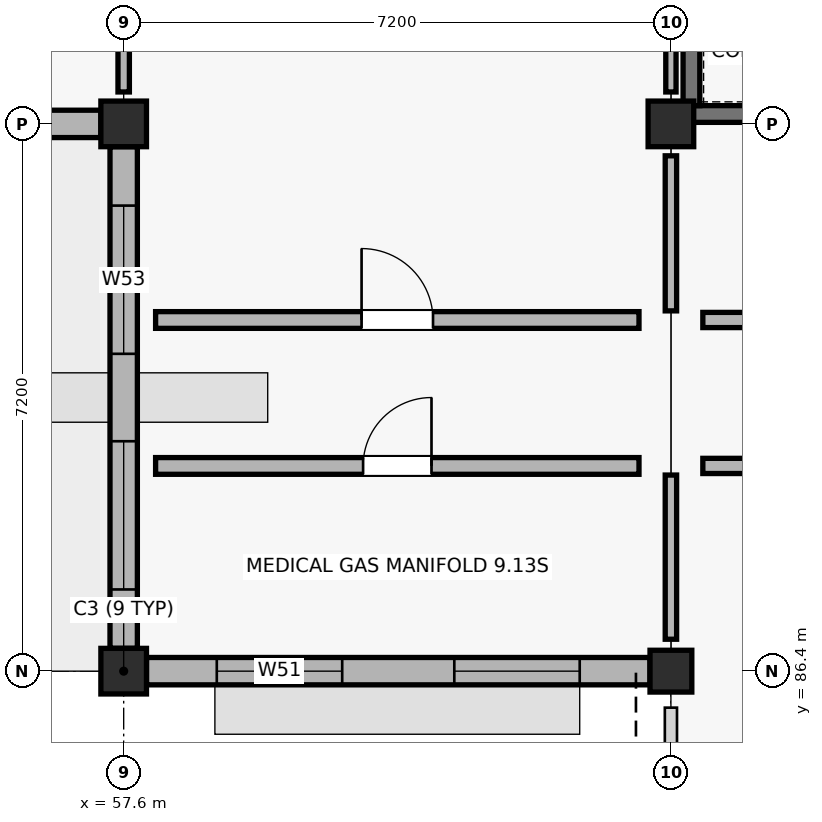
"""IFC4 building model, lengths in metres.
Left out: names, types, materials, properties, quantities, classifications, styles, units other than length and angle.
Written with IfcOpenShell. Run it as: python <this file> out.ifc"""

import sys

from ifc_helpers import new_model, si_unit, direction, frame, frame_2d, origin, origin_2d, place, context, subcontext, project, spatial, rectangle, extrude, element, fill, save


model = new_model("IFC4")
c1 = context("Model", 3, precision=1e-05, world=origin(), true_north=direction((0.0, 1.0)))
c2 = subcontext(c1, "Body", "Model", "MODEL_VIEW")
j1 = project(units=[si_unit("LENGTHUNIT", "METRE"), si_unit("PLANEANGLEUNIT", "RADIAN")], contexts=[c1])
p1 = place(None, origin())
s1 = spatial("IfcSite", under=j1, at=p1, CompositionType="ELEMENT")
p2 = place(p1, origin())
s2 = spatial("IfcBuilding", under=s1, at=p2, CompositionType="ELEMENT")
p3 = place(p2, origin())
s3 = spatial("IfcBuildingStorey", under=s2, at=p3, CompositionType="ELEMENT", Elevation=0.0)
for number, where, z_axis, x_axis in (
    (1, (57.6, 86.4, -0.25), (0.0, 0.0, 1.0), (1.0, 0.0, 0.0)),
    (2, (57.6, 93.6, -0.25), (0.0, 0.0, 1.0), (1.0, 0.0, 0.0)),
):
    element("IfcColumn", number, at=place(p3, frame(where, z_axis=z_axis, x_axis=x_axis)), inside=s3, PredefinedType="COLUMN", context=c2, shape_type="SweptSolid", body=[
        extrude(rectangle(XDim=0.6, YDim=0.6, at=origin_2d()), origin(), (0.0, 0.0, 1.0), 4.75),
    ])
p4 = place(p3, frame((64.8, 86.4, -0.25), z_axis=(0.0, 0.0, 1.0), x_axis=(1.0, 0.0, 0.0)))
e3 = element("IfcColumn", 3, at=p4, inside=s3, PredefinedType="COLUMN", context=c2, shape_type="SweptSolid", body=[
    extrude(rectangle(XDim=0.55, YDim=0.55, at=origin_2d()), origin(), (0.0, 0.0, 1.0), 4.75),
])
p5 = place(p3, frame((64.8, 93.6, -0.25), z_axis=(0.0, 0.0, 1.0), x_axis=(1.0, 0.0, 0.0)))
e4 = element("IfcColumn", 4, at=p5, inside=s3, PredefinedType="COLUMN", context=c2, shape_type="SweptSolid", body=[
    extrude(rectangle(XDim=0.6, YDim=0.6, at=origin_2d()), origin(), (0.0, 0.0, 1.0), 4.75),
])
p6 = place(p3, frame((50.7, 93.6, 0.0), z_axis=(0.0, 0.0, 1.0), x_axis=(1.0, 0.0, 0.0)))
e5 = element("IfcWall", 5, at=p6, inside=s3, PredefinedType="SOLIDWALL", context=c2, shape_type="SweptSolid", body=[
    extrude(rectangle(XDim=6.6, YDim=0.36, at=frame_2d((3.3, 0.0))), origin(), (0.0, 0.0, 1.0), 3.47),
])
p7 = place(p6, frame((0.675, 0.0, 0.9)))
e6 = element("IfcOpeningElement", 6, at=p7, cuts=e5, PredefinedType="OPENING", context=c2, shape_type="SweptSolid", body=[
    extrude(rectangle(XDim=2.15, YDim=1.75, at=frame_2d((1.075, 0.875))), frame((0.0, 0.19, 0.0), z_axis=(0.0, -1.0, 0.0), x_axis=(1.0, 0.0, 0.0)), (0.0, 0.0, 1.0), 0.38),
])
p8 = place(p6, frame((3.775, 0.0, 0.9)))
e7 = element("IfcOpeningElement", 7, at=p8, cuts=e5, PredefinedType="OPENING", context=c2, shape_type="SweptSolid", body=[
    extrude(rectangle(XDim=2.15, YDim=1.75, at=frame_2d((1.075, 0.875))), frame((0.0, 0.19, 0.0), z_axis=(0.0, -1.0, 0.0), x_axis=(1.0, 0.0, 0.0)), (0.0, 0.0, 1.0), 0.38),
])
p9 = place(p3, frame((57.9, 86.4, 0.0), z_axis=(0.0, 0.0, 1.0), x_axis=(1.0, 0.0, 0.0)))
e8 = element("IfcWall", 8, at=p9, inside=s3, PredefinedType="SOLIDWALL", context=c2, shape_type="SweptSolid", body=[
    extrude(rectangle(XDim=6.625, YDim=0.36, at=frame_2d((3.312, 0.0))), origin(), (0.0, 0.0, 1.0), 3.47),
])
p10 = place(p9, frame((0.925, 0.0, 0.9)))
e9 = element("IfcOpeningElement", 9, at=p10, cuts=e8, PredefinedType="OPENING", context=c2, shape_type="SweptSolid", body=[
    extrude(rectangle(XDim=1.65, YDim=1.88, at=frame_2d((0.825, 0.94))), frame((0.0, 0.19, 0.0), z_axis=(0.0, -1.0, 0.0), x_axis=(1.0, 0.0, 0.0)), (0.0, 0.0, 1.0), 0.38),
])
p11 = place(p9, frame((4.05, 0.0, 0.9)))
e10 = element("IfcOpeningElement", 10, at=p11, cuts=e8, PredefinedType="OPENING", context=c2, shape_type="SweptSolid", body=[
    extrude(rectangle(XDim=1.65, YDim=1.88, at=frame_2d((0.825, 0.94))), frame((0.0, 0.19, 0.0), z_axis=(0.0, -1.0, 0.0), x_axis=(1.0, 0.0, 0.0)), (0.0, 0.0, 1.0), 0.38),
])
p12 = place(p3, frame((57.6, 93.3, 0.0), z_axis=(0.0, 0.0, 1.0), x_axis=(0.0, -1.0, 0.0)))
e11 = element("IfcWall", 11, at=p12, inside=s3, PredefinedType="SOLIDWALL", context=c2, shape_type="SweptSolid", body=[
    extrude(rectangle(XDim=6.6, YDim=0.36, at=frame_2d((3.3, 0.0))), origin(), (0.0, 0.0, 1.0), 3.52),
])
p13 = place(p12, frame((0.775, 0.0, 0.9)))
e12 = element("IfcOpeningElement", 12, at=p13, cuts=e11, PredefinedType="OPENING", context=c2, shape_type="SweptSolid", body=[
    extrude(rectangle(XDim=1.95, YDim=1.88, at=frame_2d((0.975, 0.94))), frame((0.0, 0.19, 0.0), z_axis=(0.0, -1.0, 0.0), x_axis=(1.0, 0.0, 0.0)), (0.0, 0.0, 1.0), 0.38),
])
p14 = place(p12, frame((3.875, 0.0, 0.9)))
e13 = element("IfcOpeningElement", 13, at=p14, cuts=e11, PredefinedType="OPENING", context=c2, shape_type="SweptSolid", body=[
    extrude(rectangle(XDim=1.95, YDim=1.88, at=frame_2d((0.975, 0.94))), frame((0.0, 0.19, 0.0), z_axis=(0.0, -1.0, 0.0), x_axis=(1.0, 0.0, 0.0)), (0.0, 0.0, 1.0), 0.38),
])
p15 = place(p3, frame((64.96, 93.73, -0.25), z_axis=(0.0, 0.0, 1.0), x_axis=(1.0, 0.0, 0.0)))
e14 = element("IfcWall", 14, at=p15, inside=s3, PredefinedType="SHEAR", context=c2, shape_type="SweptSolid", body=[
    extrude(rectangle(XDim=6.88, YDim=0.22, at=frame_2d((3.44, 0.0))), origin(), (0.0, 0.0, 1.0), 4.47),
])
p16 = place(p3, frame((65.07, 93.84, -0.25), z_axis=(0.0, 0.0, 1.0), x_axis=(0.0, 1.0, 0.0)))
e15 = element("IfcWall", 15, at=p16, inside=s3, PredefinedType="SHEAR", context=c2, shape_type="SweptSolid", body=[
    extrude(rectangle(XDim=3.0, YDim=0.22, at=frame_2d((1.5, 0.0))), origin(), (0.0, 0.0, 1.0), 4.47),
])
p17 = place(p3, frame((65.22, 89.1, 0.0), z_axis=(0.0, 0.0, 1.0), x_axis=(1.0, 0.0, 0.0)))
e16 = element("IfcWall", 16, at=p17, inside=s3, PredefinedType="SOLIDWALL", context=c2, shape_type="SweptSolid", body=[
    extrude(rectangle(XDim=6.36, YDim=0.2, at=frame_2d((3.18, 0.0))), origin(), (0.0, 0.0, 1.0), 3.36),
])
p18 = place(p17, frame((2.505, 0.0, 0.0)))
e17 = element("IfcOpeningElement", 17, at=p18, cuts=e16, PredefinedType="OPENING", context=c2, shape_type="SweptSolid", body=[
    extrude(rectangle(XDim=1.35, YDim=2.2, at=frame_2d((0.675, 1.1))), frame((0.0, 0.11, 0.0), z_axis=(0.0, -1.0, 0.0), x_axis=(1.0, 0.0, 0.0)), (0.0, 0.0, 1.0), 0.22),
])
p19 = place(p3, frame((65.22, 91.02, 0.0), z_axis=(0.0, 0.0, 1.0), x_axis=(1.0, 0.0, 0.0)))
e18 = element("IfcWall", 18, at=p19, inside=s3, PredefinedType="SOLIDWALL", context=c2, shape_type="SweptSolid", body=[
    extrude(rectangle(XDim=6.36, YDim=0.2, at=frame_2d((3.18, 0.0))), origin(), (0.0, 0.0, 1.0), 3.36),
])
p20 = place(p19, frame((2.53, 0.0, 0.0)))
e19 = element("IfcOpeningElement", 19, at=p20, cuts=e18, PredefinedType="OPENING", context=c2, shape_type="SweptSolid", body=[
    extrude(rectangle(XDim=1.3, YDim=2.15, at=frame_2d((0.65, 1.075))), frame((0.0, 0.11, 0.0), z_axis=(0.0, -1.0, 0.0), x_axis=(1.0, 0.0, 0.0)), (0.0, 0.0, 1.0), 0.22),
])
p21 = place(p3, frame((57.6, 94.02, 0.0), z_axis=(0.0, 0.0, 1.0), x_axis=(0.0, 1.0, 0.0)))
e20 = element("IfcWall", 20, at=p21, inside=s3, PredefinedType="PARTITIONING", context=c2, shape_type="SweptSolid", body=[
    extrude(rectangle(XDim=2.16, YDim=0.15, at=frame_2d((1.08, 0.0))), origin(), (0.0, 0.0, 1.0), 3.36),
])
p22 = place(p3, frame((58.02, 89.1, 0.0), z_axis=(0.0, 0.0, 1.0), x_axis=(1.0, 0.0, 0.0)))
e21 = element("IfcWall", 21, at=p22, inside=s3, PredefinedType="SOLIDWALL", context=c2, shape_type="SweptSolid", body=[
    extrude(rectangle(XDim=6.36, YDim=0.22, at=frame_2d((3.18, 0.0))), origin(), (0.0, 0.0, 1.0), 3.36),
])
p23 = place(p22, frame((2.73, 0.0, 0.0)))
e22 = element("IfcOpeningElement", 22, at=p23, cuts=e21, PredefinedType="OPENING", context=c2, shape_type="SweptSolid", body=[
    extrude(rectangle(XDim=0.9, YDim=2.19, at=frame_2d((0.45, 1.095))), frame((0.0, 0.12, 0.0), z_axis=(0.0, -1.0, 0.0), x_axis=(1.0, 0.0, 0.0)), (0.0, 0.0, 1.0), 0.24),
])
p24 = place(p3, frame((64.8, 86.82, 0.0), z_axis=(0.0, 0.0, 1.0), x_axis=(0.0, 1.0, 0.0)))
e23 = element("IfcWall", 23, at=p24, inside=s3, PredefinedType="PARTITIONING", context=c2, shape_type="SweptSolid", body=[
    extrude(rectangle(XDim=2.16, YDim=0.15, at=frame_2d((1.08, 0.0))), origin(), (0.0, 0.0, 1.0), 3.36),
])
p25 = place(p3, frame((58.02, 91.02, 0.0), z_axis=(0.0, 0.0, 1.0), x_axis=(1.0, 0.0, 0.0)))
e24 = element("IfcWall", 24, at=p25, inside=s3, PredefinedType="SOLIDWALL", context=c2, shape_type="SweptSolid", body=[
    extrude(rectangle(XDim=6.36, YDim=0.22, at=frame_2d((3.18, 0.0))), origin(), (0.0, 0.0, 1.0), 3.36),
])
p26 = place(p25, frame((2.71, 0.0, 0.0)))
e25 = element("IfcOpeningElement", 25, at=p26, cuts=e24, PredefinedType="OPENING", context=c2, shape_type="SweptSolid", body=[
    extrude(rectangle(XDim=0.94, YDim=2.19, at=frame_2d((0.47, 1.095))), frame((0.0, 0.12, 0.0), z_axis=(0.0, -1.0, 0.0), x_axis=(1.0, 0.0, 0.0)), (0.0, 0.0, 1.0), 0.24),
])
p27 = place(p3, frame((64.8, 91.14, 0.0), z_axis=(0.0, 0.0, 1.0), x_axis=(0.0, 1.0, 0.0)))
e26 = element("IfcWall", 26, at=p27, inside=s3, PredefinedType="PARTITIONING", context=c2, shape_type="SweptSolid", body=[
    extrude(rectangle(XDim=2.04, YDim=0.15, at=frame_2d((1.02, 0.0))), origin(), (0.0, 0.0, 1.0), 3.36),
])
p28 = place(p3, frame((64.8, 94.02, 0.0), z_axis=(0.0, 0.0, 1.0), x_axis=(0.0, 1.0, 0.0)))
e27 = element("IfcWall", 27, at=p28, inside=s3, PredefinedType="PARTITIONING", context=c2, shape_type="SweptSolid", body=[
    extrude(rectangle(XDim=2.16, YDim=0.135, at=frame_2d((1.08, 0.0))), origin(), (0.0, 0.0, 1.0), 3.36),
])
p29 = place(p10, origin())
e28 = element("IfcWindow", 28, at=p29, inside=s3, PartitioningType="SINGLE_PANEL", PredefinedType="WINDOW", context=c2, shape_type="SweptSolid", body=[
    extrude(rectangle(XDim=1.65, YDim=1.88, at=frame_2d((0.825, 0.94))), frame((0.0, 0.03, 0.0), z_axis=(0.0, -1.0, 0.0), x_axis=(1.0, 0.0, 0.0)), (0.0, 0.0, 1.0), 0.06),
])
fill(e9, e28)
p30 = place(p11, origin())
e29 = element("IfcWindow", 29, at=p30, inside=s3, PartitioningType="SINGLE_PANEL", PredefinedType="WINDOW", context=c2, shape_type="SweptSolid", body=[
    extrude(rectangle(XDim=1.65, YDim=1.88, at=frame_2d((0.825, 0.94))), frame((0.0, 0.03, 0.0), z_axis=(0.0, -1.0, 0.0), x_axis=(1.0, 0.0, 0.0)), (0.0, 0.0, 1.0), 0.06),
])
fill(e10, e29)
p31 = place(p13, origin())
e30 = element("IfcWindow", 30, at=p31, inside=s3, PartitioningType="SINGLE_PANEL", PredefinedType="WINDOW", context=c2, shape_type="SweptSolid", body=[
    extrude(rectangle(XDim=1.95, YDim=1.88, at=frame_2d((0.975, 0.94))), frame((0.0, 0.03, 0.0), z_axis=(0.0, -1.0, 0.0), x_axis=(1.0, 0.0, 0.0)), (0.0, 0.0, 1.0), 0.06),
])
fill(e12, e30)
p32 = place(p14, origin())
e31 = element("IfcWindow", 31, at=p32, inside=s3, PartitioningType="SINGLE_PANEL", PredefinedType="WINDOW", context=c2, shape_type="SweptSolid", body=[
    extrude(rectangle(XDim=1.95, YDim=1.88, at=frame_2d((0.975, 0.94))), frame((0.0, 0.03, 0.0), z_axis=(0.0, -1.0, 0.0), x_axis=(1.0, 0.0, 0.0)), (0.0, 0.0, 1.0), 0.06),
])
fill(e13, e31)
p33 = place(p23, origin())
e32 = element("IfcDoor", 32, at=p33, inside=s3, OperationType="SINGLE_SWING_RIGHT", PredefinedType="DOOR", context=c2, shape_type="SweptSolid", body=[
    extrude(rectangle(XDim=0.9, YDim=2.19, at=frame_2d((0.45, 1.095))), frame((0.0, 0.025, 0.0), z_axis=(0.0, -1.0, 0.0), x_axis=(1.0, 0.0, 0.0)), (0.0, 0.0, 1.0), 0.05),
])
fill(e22, e32)
p34 = place(p26, origin())
e33 = element("IfcDoor", 33, at=p34, inside=s3, OperationType="SINGLE_SWING_LEFT", PredefinedType="DOOR", context=c2, shape_type="SweptSolid", body=[
    extrude(rectangle(XDim=0.94, YDim=2.19, at=frame_2d((0.47, 1.095))), frame((0.0, 0.025, 0.0), z_axis=(0.0, -1.0, 0.0), x_axis=(1.0, 0.0, 0.0)), (0.0, 0.0, 1.0), 0.05),
])
fill(e25, e33)
save(model, sys.argv[1])
